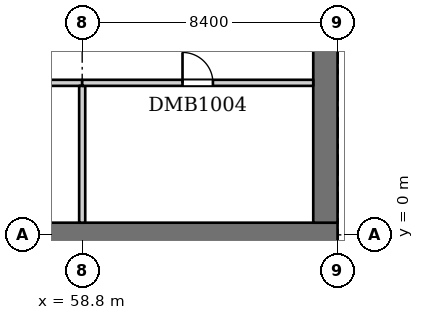
"""IFC4 building model, lengths in metres.
Left out: names, types, materials, properties, quantities, classifications, styles, units other than length and angle.
Written with IfcOpenShell. Run it as: python <this file> out.ifc"""

import sys

from ifc_helpers import new_model, si_unit, direction, frame, frame_2d, origin, place, context, subcontext, project, spatial, rectangle, extrude, element, fill, save


model = new_model("IFC4")
c1 = context("Model", 3, precision=1e-05, world=origin(), true_north=direction((0.0, 1.0)))
c2 = subcontext(c1, "Body", "Model", "MODEL_VIEW")
j1 = project(units=[si_unit("LENGTHUNIT", "METRE"), si_unit("PLANEANGLEUNIT", "RADIAN")], contexts=[c1])
p1 = place(None, origin())
s1 = spatial("IfcSite", under=j1, at=p1, CompositionType="ELEMENT")
p2 = place(p1, origin())
s2 = spatial("IfcBuilding", under=s1, at=p2, CompositionType="ELEMENT")
p3 = place(p2, frame((0.0, 0.0, -4.0)))
s3 = spatial("IfcBuildingStorey", under=s2, at=p3, CompositionType="ELEMENT", Elevation=-4.0)
p4 = place(p3, frame((-8.8, 0.0, 0.0), z_axis=(0.0, 0.0, 1.0), x_axis=(1.0, 0.0, 0.0)))
e1 = element("IfcWall", 1, at=p4, inside=s3, PredefinedType="SOLIDWALL", context=c2, shape_type="SweptSolid", body=[
    extrude(rectangle(XDim=76.0, YDim=0.8, at=frame_2d((38.0, 0.0))), origin(), (0.0, 0.0, 1.0), 3.6),
])
p5 = place(p3, frame((66.8, 0.4, 0.0), z_axis=(0.0, 0.0, 1.0), x_axis=(0.0, 1.0, 0.0)))
e2 = element("IfcWall", 2, at=p5, inside=s3, PredefinedType="SOLIDWALL", context=c2, shape_type="SweptSolid", body=[
    extrude(rectangle(XDim=36.2, YDim=0.8, at=frame_2d((18.1, 0.0))), origin(), (0.0, 0.0, 1.0), 3.6),
])
p6 = place(p3, frame((44.9, 5.0, 0.0), z_axis=(0.0, 0.0, 1.0), x_axis=(1.0, 0.0, 0.0)))
e3 = element("IfcWall", 3, at=p6, inside=s3, PredefinedType="PARTITIONING", context=c2, shape_type="SweptSolid", body=[
    extrude(rectangle(XDim=13.9, YDim=0.2, at=frame_2d((6.95, 0.0))), origin(), (0.0, 0.0, 1.0), 3.6),
])
p7 = place(p6, frame((6.45, 0.0, 0.0)))
e4 = element("IfcOpeningElement", 4, at=p7, cuts=e3, PredefinedType="OPENING", context=c2, shape_type="SweptSolid", body=[
    extrude(rectangle(XDim=1.0, YDim=2.1, at=frame_2d((0.5, 1.05))), frame((0.0, 0.11, 0.0), z_axis=(0.0, -1.0, 0.0), x_axis=(1.0, 0.0, 0.0)), (0.0, 0.0, 1.0), 0.22),
])
p8 = place(p3, frame((58.8, 0.4, 0.0), z_axis=(0.0, 0.0, 1.0), x_axis=(0.0, 1.0, 0.0)))
e5 = element("IfcWall", 5, at=p8, inside=s3, PredefinedType="PARTITIONING", context=c2, shape_type="SweptSolid", body=[
    extrude(rectangle(XDim=4.5, YDim=0.2, at=frame_2d((2.25, 0.0))), origin(), (0.0, 0.0, 1.0), 3.6),
])
p9 = place(p3, frame((58.8, 5.0, 0.0), z_axis=(0.0, 0.0, 1.0), x_axis=(1.0, 0.0, 0.0)))
e6 = element("IfcWall", 6, at=p9, inside=s3, PredefinedType="PARTITIONING", context=c2, shape_type="SweptSolid", body=[
    extrude(rectangle(XDim=7.6, YDim=0.2, at=frame_2d((3.8, 0.0))), origin(), (0.0, 0.0, 1.0), 3.6),
])
p10 = place(p9, frame((3.3, 0.0, 0.0)))
e7 = element("IfcOpeningElement", 7, at=p10, cuts=e6, PredefinedType="OPENING", context=c2, shape_type="SweptSolid", body=[
    extrude(rectangle(XDim=1.0, YDim=2.1, at=frame_2d((0.5, 1.05))), frame((0.0, 0.11, 0.0), z_axis=(0.0, -1.0, 0.0), x_axis=(1.0, 0.0, 0.0)), (0.0, 0.0, 1.0), 0.22),
])
p11 = place(p10, origin())
e8 = element("IfcDoor", 8, at=p11, inside=s3, OperationType="SINGLE_SWING_LEFT", PredefinedType="DOOR", context=c2, shape_type="SweptSolid", body=[
    extrude(rectangle(XDim=1.0, YDim=2.1, at=frame_2d((0.5, 1.05))), frame((0.0, 0.025, 0.0), z_axis=(0.0, -1.0, 0.0), x_axis=(1.0, 0.0, 0.0)), (0.0, 0.0, 1.0), 0.05),
])
fill(e7, e8)
save(model, sys.argv[1])
